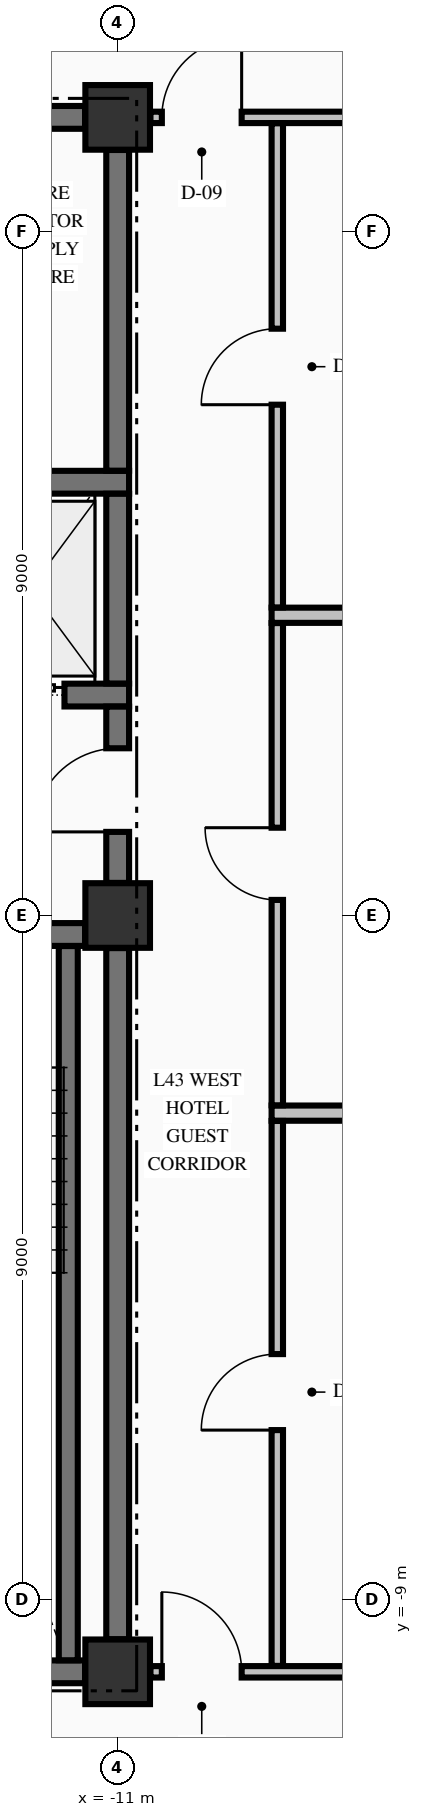
"""IFC4 building model, lengths in metres.
Left out: names, types, materials, properties, quantities, classifications, styles, units other than length and angle.
Written with IfcOpenShell. Run it as: python <this file> out.ifc"""

import sys

from ifc_helpers import new_model, si_unit, direction, frame, frame_2d, origin, origin_2d, place, context, subcontext, project, spatial, rectangle, extrude, element, fill, save


model = new_model("IFC4")
c1 = context("Model", 3, precision=1e-05, world=origin(), true_north=direction((0.0, 1.0)))
c2 = subcontext(c1, "Body", "Model", "MODEL_VIEW")
j1 = project(units=[si_unit("LENGTHUNIT", "METRE"), si_unit("PLANEANGLEUNIT", "RADIAN")], contexts=[c1])
p1 = place(None, origin())
s1 = spatial("IfcSite", under=j1, at=p1, CompositionType="ELEMENT")
p2 = place(p1, origin())
s2 = spatial("IfcBuilding", under=s1, at=p2, CompositionType="ELEMENT")
p3 = place(p2, frame((0.0, 0.0, 169.46)))
s3 = spatial("IfcBuildingStorey", under=s2, at=p3, CompositionType="ELEMENT", Elevation=169.46)
for number, where, z_axis, x_axis in (
    (1, (-11.0, -9.95, -0.25), (0.0, 0.0, 1.0), (1.0, 0.0, 0.0)),
    (2, (-11.0, 0.0, -0.25), (0.0, 0.0, 1.0), (1.0, 0.0, 0.0)),
    (3, (-11.0, 10.5, -0.25), (0.0, 0.0, 1.0), (1.0, 0.0, 0.0)),
):
    element("IfcColumn", number, at=place(p3, frame(where, z_axis=z_axis, x_axis=x_axis)), inside=s3, PredefinedType="COLUMN", context=c2, shape_type="SweptSolid", body=[
        extrude(rectangle(XDim=0.85, YDim=0.85, at=origin_2d()), origin(), (0.0, 0.0, 1.0), 3.4),
    ])
p4 = place(p3, frame((-14.7, -9.95, 0.0), z_axis=(0.0, 0.0, 1.0), x_axis=(1.0, 0.0, 0.0)))
e4 = element("IfcWall", 4, at=p4, inside=s3, PredefinedType="SHEAR", context=c2, shape_type="SweptSolid", body=[
    extrude(rectangle(XDim=3.271, YDim=0.3, at=frame_2d((1.635, 0.0))), origin(), (0.0, 0.0, 1.0), 3.15),
])
p5 = place(p3, frame((-19.571, -0.25, 0.0), z_axis=(0.0, 0.0, 1.0), x_axis=(1.0, 0.0, 0.0)))
e5 = element("IfcWall", 5, at=p5, inside=s3, PredefinedType="SHEAR", context=c2, shape_type="SweptSolid", body=[
    extrude(rectangle(XDim=8.142, YDim=0.3, at=frame_2d((4.071, 0.0))), origin(), (0.0, 0.0, 1.0), 3.15),
])
p6 = place(p5, frame((5.871, 0.0, 0.0)))
e6 = element("IfcOpeningElement", 6, at=p6, cuts=e5, PredefinedType="OPENING", context=c2, shape_type="SweptSolid", body=[
    extrude(rectangle(XDim=1.1, YDim=2.15, at=frame_2d((0.55, 1.075))), frame((0.0, 0.16, 0.0), z_axis=(0.0, -1.0, 0.0), x_axis=(1.0, 0.0, 0.0)), (0.0, 0.0, 1.0), 0.32),
])
p7 = place(p3, frame((-14.875, 2.9, 0.0), z_axis=(0.0, 0.0, 1.0), x_axis=(1.0, 0.0, 0.0)))
e7 = element("IfcWall", 7, at=p7, inside=s3, PredefinedType="SHEAR", context=c2, shape_type="SweptSolid", body=[
    extrude(rectangle(XDim=4.025, YDim=0.3, at=frame_2d((2.012, 0.0))), origin(), (0.0, 0.0, 1.0), 3.15),
])
p8 = place(p7, frame((2.075, 0.0, 0.0)))
e8 = element("IfcOpeningElement", 8, at=p8, cuts=e7, PredefinedType="OPENING", context=c2, shape_type="SweptSolid", body=[
    extrude(rectangle(XDim=1.1, YDim=2.2, at=frame_2d((0.55, 1.1))), frame((0.0, 0.16, 0.0), z_axis=(0.0, -1.0, 0.0), x_axis=(1.0, 0.0, 0.0)), (0.0, 0.0, 1.0), 0.32),
])
p9 = place(p3, frame((-14.875, 5.7, 0.0), z_axis=(0.0, 0.0, 1.0), x_axis=(1.0, 0.0, 0.0)))
e9 = element("IfcWall", 9, at=p9, inside=s3, PredefinedType="SHEAR", context=c2, shape_type="SweptSolid", body=[
    extrude(rectangle(XDim=4.025, YDim=0.3, at=frame_2d((2.012, 0.0))), origin(), (0.0, 0.0, 1.0), 3.15),
])
p10 = place(p3, frame((-14.7, 10.5, 0.0), z_axis=(0.0, 0.0, 1.0), x_axis=(1.0, 0.0, 0.0)))
e10 = element("IfcWall", 10, at=p10, inside=s3, PredefinedType="SHEAR", context=c2, shape_type="SweptSolid", body=[
    extrude(rectangle(XDim=3.271, YDim=0.3, at=frame_2d((1.635, 0.0))), origin(), (0.0, 0.0, 1.0), 3.15),
])
p11 = place(p10, frame((0.245, 0.0, 0.0)))
e11 = element("IfcOpeningElement", 11, at=p11, cuts=e10, PredefinedType="OPENING", context=c2, shape_type="SweptSolid", body=[
    extrude(rectangle(XDim=0.95, YDim=2.15, at=frame_2d((0.475, 1.075))), frame((0.0, 0.16, 0.0), z_axis=(0.0, -1.0, 0.0), x_axis=(1.0, 0.0, 0.0)), (0.0, 0.0, 1.0), 0.32),
])
p12 = place(p3, frame((-10.569, -9.95, 0.0), z_axis=(0.0, 0.0, 1.0), x_axis=(1.0, 0.0, 0.0)))
e12 = element("IfcWall", 12, at=p12, inside=s3, PredefinedType="PARTITIONING", context=c2, shape_type="SweptSolid", body=[
    extrude(rectangle(XDim=21.138, YDim=0.15, at=frame_2d((10.569, 0.0))), origin(), (0.0, 0.0, 1.0), 3.15),
])
p13 = place(p12, frame((0.15, 0.0, 0.0)))
e13 = element("IfcOpeningElement", 13, at=p13, cuts=e12, PredefinedType="OPENING", context=c2, shape_type="SweptSolid", body=[
    extrude(rectangle(XDim=1.05, YDim=2.15, at=frame_2d((0.525, 1.075))), frame((0.0, 0.085, 0.0), z_axis=(0.0, -1.0, 0.0), x_axis=(1.0, 0.0, 0.0)), (0.0, 0.0, 1.0), 0.17),
])
p14 = place(p12, frame((19.938, 0.0, 0.0)))
e14 = element("IfcOpeningElement", 14, at=p14, cuts=e12, PredefinedType="OPENING", context=c2, shape_type="SweptSolid", body=[
    extrude(rectangle(XDim=1.05, YDim=2.15, at=frame_2d((0.525, 1.075))), frame((0.0, 0.085, 0.0), z_axis=(0.0, -1.0, 0.0), x_axis=(1.0, 0.0, 0.0)), (0.0, 0.0, 1.0), 0.17),
])
p15 = place(p12, frame((12.144, 0.0, 0.0)))
e15 = element("IfcOpeningElement", 15, at=p15, cuts=e12, PredefinedType="OPENING", context=c2, shape_type="SweptSolid", body=[
    extrude(rectangle(XDim=0.95, YDim=2.15, at=frame_2d((0.475, 1.075))), frame((0.0, 0.085, 0.0), z_axis=(0.0, -1.0, 0.0), x_axis=(1.0, 0.0, 0.0)), (0.0, 0.0, 1.0), 0.17),
])
for number, where, z_axis, x_axis in (
    (16, (-8.975, -2.6, 0.0), (0.0, 0.0, 1.0), (1.0, 0.0, 0.0)),
    (17, (-8.975, 3.95, 0.0), (0.0, 0.0, 1.0), (1.0, 0.0, 0.0)),
):
    element("IfcWall", number, at=place(p3, frame(where, z_axis=z_axis, x_axis=x_axis)), inside=s3, PredefinedType="PARTITIONING", context=c2, shape_type="SweptSolid", body=[
        extrude(rectangle(XDim=7.275, YDim=0.2, at=frame_2d((3.638, 0.0))), origin(), (0.0, 0.0, 1.0), 3.15),
    ])
p16 = place(p3, frame((-10.569, 10.5, 0.0), z_axis=(0.0, 0.0, 1.0), x_axis=(1.0, 0.0, 0.0)))
e18 = element("IfcWall", 18, at=p16, inside=s3, PredefinedType="PARTITIONING", context=c2, shape_type="SweptSolid", body=[
    extrude(rectangle(XDim=21.138, YDim=0.15, at=frame_2d((10.569, 0.0))), origin(), (0.0, 0.0, 1.0), 3.15),
])
p17 = place(p16, frame((0.15, 0.0, 0.0)))
e19 = element("IfcOpeningElement", 19, at=p17, cuts=e18, PredefinedType="OPENING", context=c2, shape_type="SweptSolid", body=[
    extrude(rectangle(XDim=1.05, YDim=2.15, at=frame_2d((0.525, 1.075))), frame((0.0, 0.085, 0.0), z_axis=(0.0, -1.0, 0.0), x_axis=(1.0, 0.0, 0.0)), (0.0, 0.0, 1.0), 0.17),
])
p18 = place(p16, frame((19.938, 0.0, 0.0)))
e20 = element("IfcOpeningElement", 20, at=p18, cuts=e18, PredefinedType="OPENING", context=c2, shape_type="SweptSolid", body=[
    extrude(rectangle(XDim=1.05, YDim=2.15, at=frame_2d((0.525, 1.075))), frame((0.0, 0.085, 0.0), z_axis=(0.0, -1.0, 0.0), x_axis=(1.0, 0.0, 0.0)), (0.0, 0.0, 1.0), 0.17),
])
p19 = place(p3, frame((-11.65, -9.798, 0.0), z_axis=(0.0, 0.0, 1.0), x_axis=(0.0, 1.0, 0.0)))
e21 = element("IfcWall", 21, at=p19, inside=s3, PredefinedType="SOLIDWALL", context=c2, shape_type="SweptSolid", body=[
    extrude(rectangle(XDim=9.396, YDim=0.25, at=frame_2d((4.698, 0.0))), origin(), (0.0, 0.0, 1.0), 3.15),
])
p20 = place(p3, frame((-11.0, -9.521, 0.0), z_axis=(0.0, 0.0, 1.0), x_axis=(0.0, 1.0, 0.0)))
e22 = element("IfcWall", 22, at=p20, inside=s3, PredefinedType="SHEAR", context=c2, shape_type="SweptSolid", body=[
    extrude(rectangle(XDim=9.092, YDim=0.3, at=frame_2d((4.546, 0.0))), origin(), (0.0, 0.0, 1.0), 3.15),
])
p21 = place(p3, frame((-11.0, 0.429, 0.0), z_axis=(0.0, 0.0, 1.0), x_axis=(0.0, 1.0, 0.0)))
e23 = element("IfcWall", 23, at=p21, inside=s3, PredefinedType="SHEAR", context=c2, shape_type="SweptSolid", body=[
    extrude(rectangle(XDim=2.319, YDim=0.3, at=frame_2d((1.16, 0.0))), origin(), (0.0, 0.0, 1.0), 3.15),
])
p22 = place(p21, frame((0.671, 0.0, 0.0)))
e24 = element("IfcOpeningElement", 24, at=p22, cuts=e23, PredefinedType="OPENING", context=c2, shape_type="SweptSolid", body=[
    extrude(rectangle(XDim=1.1, YDim=2.15, at=frame_2d((0.55, 1.075))), frame((0.0, 0.16, 0.0), z_axis=(0.0, -1.0, 0.0), x_axis=(1.0, 0.0, 0.0)), (0.0, 0.0, 1.0), 0.32),
])
p23 = place(p3, frame((-11.0, 3.052, 0.0), z_axis=(0.0, 0.0, 1.0), x_axis=(0.0, 1.0, 0.0)))
e25 = element("IfcWall", 25, at=p23, inside=s3, PredefinedType="SHEAR", context=c2, shape_type="SweptSolid", body=[
    extrude(rectangle(XDim=2.496, YDim=0.3, at=frame_2d((1.248, 0.0))), origin(), (0.0, 0.0, 1.0), 3.15),
])
p24 = place(p3, frame((-11.0, 5.852, 0.0), z_axis=(0.0, 0.0, 1.0), x_axis=(0.0, 1.0, 0.0)))
e26 = element("IfcWall", 26, at=p24, inside=s3, PredefinedType="SHEAR", context=c2, shape_type="SweptSolid", body=[
    extrude(rectangle(XDim=4.219, YDim=0.3, at=frame_2d((2.109, 0.0))), origin(), (0.0, 0.0, 1.0), 3.15),
])
p25 = place(p3, frame((-8.9, -9.872, 0.0), z_axis=(0.0, 0.0, 1.0), x_axis=(0.0, 1.0, 0.0)))
e27 = element("IfcWall", 27, at=p25, inside=s3, PredefinedType="PARTITIONING", context=c2, shape_type="SweptSolid", body=[
    extrude(rectangle(XDim=7.169, YDim=0.15, at=frame_2d((3.584, 0.0))), origin(), (0.0, 0.0, 1.0), 3.15),
])
p26 = place(p25, frame((3.102, 0.0, 0.0)))
e28 = element("IfcOpeningElement", 28, at=p26, cuts=e27, PredefinedType="OPENING", context=c2, shape_type="SweptSolid", body=[
    extrude(rectangle(XDim=1.0, YDim=2.15, at=frame_2d((0.5, 1.075))), frame((0.0, 0.085, 0.0), z_axis=(0.0, -1.0, 0.0), x_axis=(1.0, 0.0, 0.0)), (0.0, 0.0, 1.0), 0.17),
])
p27 = place(p3, frame((-8.9, -2.497, 0.0), z_axis=(0.0, 0.0, 1.0), x_axis=(0.0, 1.0, 0.0)))
e29 = element("IfcWall", 29, at=p27, inside=s3, PredefinedType="PARTITIONING", context=c2, shape_type="SweptSolid", body=[
    extrude(rectangle(XDim=6.344, YDim=0.15, at=frame_2d((3.172, 0.0))), origin(), (0.0, 0.0, 1.0), 3.15),
])
p28 = place(p27, frame((2.702, 0.0, 0.0)))
e30 = element("IfcOpeningElement", 30, at=p28, cuts=e29, PredefinedType="OPENING", context=c2, shape_type="SweptSolid", body=[
    extrude(rectangle(XDim=0.95, YDim=2.15, at=frame_2d((0.475, 1.075))), frame((0.0, 0.085, 0.0), z_axis=(0.0, -1.0, 0.0), x_axis=(1.0, 0.0, 0.0)), (0.0, 0.0, 1.0), 0.17),
])
p29 = place(p3, frame((-8.9, 4.053, 0.0), z_axis=(0.0, 0.0, 1.0), x_axis=(0.0, 1.0, 0.0)))
e31 = element("IfcWall", 31, at=p29, inside=s3, PredefinedType="PARTITIONING", context=c2, shape_type="SweptSolid", body=[
    extrude(rectangle(XDim=6.369, YDim=0.15, at=frame_2d((3.185, 0.0))), origin(), (0.0, 0.0, 1.0), 3.15),
])
p30 = place(p29, frame((2.667, 0.0, 0.0)))
e32 = element("IfcOpeningElement", 32, at=p30, cuts=e31, PredefinedType="OPENING", context=c2, shape_type="SweptSolid", body=[
    extrude(rectangle(XDim=1.0, YDim=2.15, at=frame_2d((0.5, 1.075))), frame((0.0, 0.085, 0.0), z_axis=(0.0, -1.0, 0.0), x_axis=(1.0, 0.0, 0.0)), (0.0, 0.0, 1.0), 0.17),
])
p31 = place(p22, origin())
e33 = element("IfcDoor", 33, at=p31, inside=s3, OperationType="SINGLE_SWING_LEFT", PredefinedType="DOOR", context=c2, shape_type="SweptSolid", body=[
    extrude(rectangle(XDim=1.1, YDim=2.15, at=frame_2d((0.55, 1.075))), frame((0.0, 0.025, 0.0), z_axis=(0.0, -1.0, 0.0), x_axis=(1.0, 0.0, 0.0)), (0.0, 0.0, 1.0), 0.05),
])
fill(e24, e33)
p32 = place(p8, origin())
e34 = element("IfcDoor", 34, at=p32, inside=s3, OperationType="SLIDING_TO_LEFT", PredefinedType="DOOR", context=c2, shape_type="SweptSolid", body=[
    extrude(rectangle(XDim=1.1, YDim=2.2, at=frame_2d((0.55, 1.1))), frame((0.0, 0.025, 0.0), z_axis=(0.0, -1.0, 0.0), x_axis=(1.0, 0.0, 0.0)), (0.0, 0.0, 1.0), 0.05),
])
fill(e8, e34)
p33 = place(p17, origin())
e35 = element("IfcDoor", 35, at=p33, inside=s3, OperationType="SINGLE_SWING_RIGHT", PredefinedType="DOOR", context=c2, shape_type="SweptSolid", body=[
    extrude(rectangle(XDim=1.05, YDim=2.15, at=frame_2d((0.525, 1.075))), frame((0.0, 0.025, 0.0), z_axis=(0.0, -1.0, 0.0), x_axis=(1.0, 0.0, 0.0)), (0.0, 0.0, 1.0), 0.05),
])
fill(e19, e35)
p34 = place(p13, origin())
e36 = element("IfcDoor", 36, at=p34, inside=s3, OperationType="SINGLE_SWING_LEFT", PredefinedType="DOOR", context=c2, shape_type="SweptSolid", body=[
    extrude(rectangle(XDim=1.05, YDim=2.15, at=frame_2d((0.525, 1.075))), frame((0.0, 0.025, 0.0), z_axis=(0.0, -1.0, 0.0), x_axis=(1.0, 0.0, 0.0)), (0.0, 0.0, 1.0), 0.05),
])
fill(e13, e36)
p35 = place(p30, origin())
e37 = element("IfcDoor", 37, at=p35, inside=s3, OperationType="SINGLE_SWING_LEFT", PredefinedType="DOOR", context=c2, shape_type="SweptSolid", body=[
    extrude(rectangle(XDim=1.0, YDim=2.15, at=frame_2d((0.5, 1.075))), frame((0.0, 0.025, 0.0), z_axis=(0.0, -1.0, 0.0), x_axis=(1.0, 0.0, 0.0)), (0.0, 0.0, 1.0), 0.05),
])
fill(e32, e37)
p36 = place(p28, origin())
e38 = element("IfcDoor", 38, at=p36, inside=s3, OperationType="SINGLE_SWING_RIGHT", PredefinedType="DOOR", context=c2, shape_type="SweptSolid", body=[
    extrude(rectangle(XDim=0.95, YDim=2.15, at=frame_2d((0.475, 1.075))), frame((0.0, 0.025, 0.0), z_axis=(0.0, -1.0, 0.0), x_axis=(1.0, 0.0, 0.0)), (0.0, 0.0, 1.0), 0.05),
])
fill(e30, e38)
p37 = place(p26, origin())
e39 = element("IfcDoor", 39, at=p37, inside=s3, OperationType="SINGLE_SWING_LEFT", PredefinedType="DOOR", context=c2, shape_type="SweptSolid", body=[
    extrude(rectangle(XDim=1.0, YDim=2.15, at=frame_2d((0.5, 1.075))), frame((0.0, 0.025, 0.0), z_axis=(0.0, -1.0, 0.0), x_axis=(1.0, 0.0, 0.0)), (0.0, 0.0, 1.0), 0.05),
])
fill(e28, e39)
save(model, sys.argv[1])
